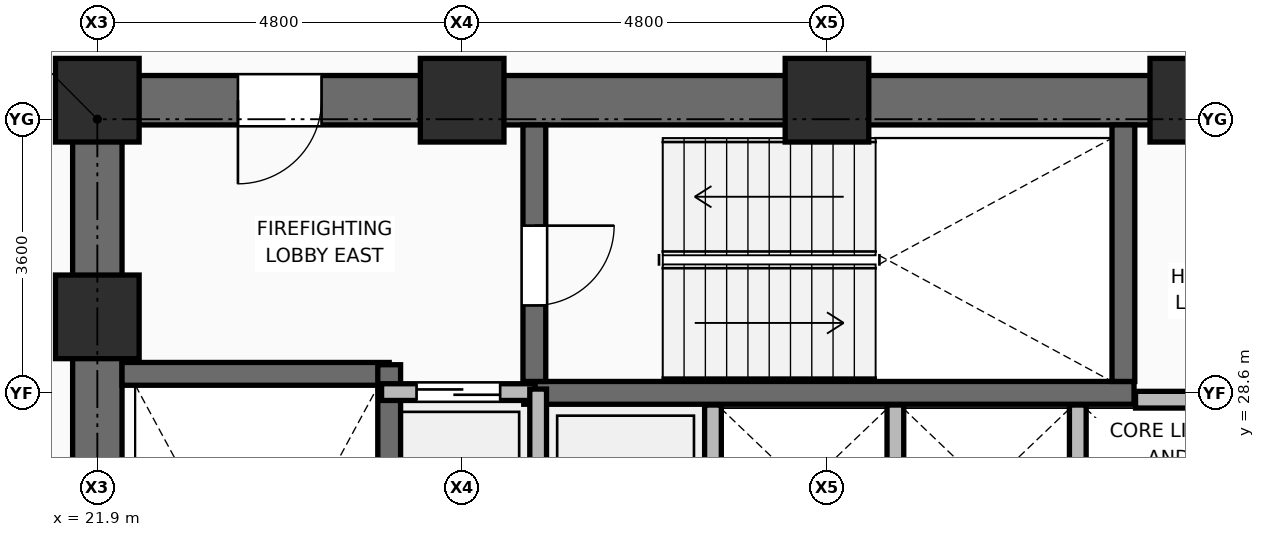
"""IFC4 building model, lengths in metres.
Left out: names, types, materials, properties, quantities, classifications, styles, units other than length and angle.
Written with IfcOpenShell. Run it as: python <this file> out.ifc"""

import sys

from ifc_helpers import new_model, si_unit, direction, frame, frame_2d, origin, origin_2d, place, context, subcontext, project, spatial, rectangle, extrude, element, fill, save


model = new_model("IFC4")
c1 = context("Model", 3, precision=1e-05, world=origin(), true_north=direction((0.0, 1.0)))
c2 = subcontext(c1, "Body", "Model", "MODEL_VIEW")
j1 = project(units=[si_unit("LENGTHUNIT", "METRE"), si_unit("PLANEANGLEUNIT", "RADIAN")], contexts=[c1])
p1 = place(None, origin())
s1 = spatial("IfcSite", under=j1, at=p1, CompositionType="ELEMENT")
p2 = place(p1, origin())
s2 = spatial("IfcBuilding", under=s1, at=p2, CompositionType="ELEMENT")
p3 = place(p2, frame((0.0, 0.0, 60.75)))
s3 = spatial("IfcBuildingStorey", under=s2, at=p3, CompositionType="ELEMENT", Elevation=60.75)
for number, where, z_axis, x_axis in (
    (1, (21.9, 29.6, 0.0), (0.0, 0.0, 1.0), (1.0, 0.0, 0.0)),
    (2, (21.9, 32.45, 0.0), (0.0, 0.0, 1.0), (1.0, 0.0, 0.0)),
    (3, (26.7, 32.45, 0.0), (0.0, 0.0, 1.0), (1.0, 0.0, 0.0)),
    (4, (31.5, 32.45, 0.0), (0.0, 0.0, 1.0), (1.0, 0.0, 0.0)),
    (5, (36.3, 32.45, 0.0), (0.0, 0.0, 1.0), (1.0, 0.0, 0.0)),
):
    element("IfcColumn", number, at=place(p3, frame(where, z_axis=z_axis, x_axis=x_axis)), inside=s3, PredefinedType="COLUMN", context=c2, shape_type="SweptSolid", body=[
        extrude(rectangle(XDim=1.1, YDim=1.1, at=origin_2d()), origin(), (0.0, 0.0, 1.0), 3.75),
    ])
p4 = place(p3, frame((30.0, 25.71, 0.0), z_axis=(0.0, 0.0, 1.0), x_axis=(0.0, 1.0, 0.0)))
e6 = element("IfcWall", 6, at=p4, inside=s3, PredefinedType="PARTITIONING", context=c2, shape_type="SweptSolid", body=[
    extrude(rectangle(XDim=2.73, YDim=0.22, at=frame_2d((1.365, 0.0))), origin(), (0.0, 0.0, 1.0), 3.545),
])
p5 = place(p3, frame((32.4, 26.2, 0.0), z_axis=(0.0, 0.0, 1.0), x_axis=(0.0, 1.0, 0.0)))
e7 = element("IfcWall", 7, at=p5, inside=s3, PredefinedType="PARTITIONING", context=c2, shape_type="SweptSolid", body=[
    extrude(rectangle(XDim=2.24, YDim=0.22, at=frame_2d((1.12, 0.0))), origin(), (0.0, 0.0, 1.0), 3.545),
])
p6 = place(p3, frame((34.8, 26.23, 0.0), z_axis=(0.0, 0.0, 1.0), x_axis=(0.0, 1.0, 0.0)))
e8 = element("IfcWall", 8, at=p6, inside=s3, PredefinedType="PARTITIONING", context=c2, shape_type="SweptSolid", body=[
    extrude(rectangle(XDim=2.21, YDim=0.22, at=frame_2d((1.105, 0.0))), origin(), (0.0, 0.0, 1.0), 3.545),
])
p7 = place(p3, frame((21.575, 32.45, 0.0), z_axis=(0.0, 0.0, 1.0), x_axis=(1.0, 0.0, 0.0)))
e9 = element("IfcWall", 9, at=p7, inside=s3, PredefinedType="SHEAR", context=c2, shape_type="SweptSolid", body=[
    extrude(rectangle(XDim=19.85, YDim=0.65, at=frame_2d((9.925, 0.0))), origin(), (0.0, 0.0, 1.0), 3.57),
])
p8 = place(p7, frame((2.175, 0.0, 0.0)))
e10 = element("IfcOpeningElement", 10, at=p8, cuts=e9, PredefinedType="OPENING", context=c2, shape_type="SweptSolid", body=[
    extrude(rectangle(XDim=1.1, YDim=2.1, at=frame_2d((0.55, 1.05))), frame((0.0, 0.335, 0.0), z_axis=(0.0, -1.0, 0.0), x_axis=(1.0, 0.0, 0.0)), (0.0, 0.0, 1.0), 0.67),
])
p9 = place(p7, frame((15.565, 0.0, 0.0)))
e11 = element("IfcOpeningElement", 11, at=p9, cuts=e9, PredefinedType="OPENING", context=c2, shape_type="SweptSolid", body=[
    extrude(rectangle(XDim=1.0, YDim=2.1, at=frame_2d((0.5, 1.05))), frame((0.0, 0.335, 0.0), z_axis=(0.0, -1.0, 0.0), x_axis=(1.0, 0.0, 0.0)), (0.0, 0.0, 1.0), 0.67),
])
p10 = place(p7, frame((17.575, 0.0, 0.0)))
e12 = element("IfcOpeningElement", 12, at=p10, cuts=e9, PredefinedType="OPENING", context=c2, shape_type="SweptSolid", body=[
    extrude(rectangle(XDim=0.9, YDim=2.1, at=frame_2d((0.45, 1.05))), frame((0.0, 0.335, 0.0), z_axis=(0.0, -1.0, 0.0), x_axis=(1.0, 0.0, 0.0)), (0.0, 0.0, 1.0), 0.67),
])
p11 = place(p3, frame((21.9, 18.125, 0.0), z_axis=(0.0, 0.0, 1.0), x_axis=(0.0, 1.0, 0.0)))
e13 = element("IfcWall", 13, at=p11, inside=s3, PredefinedType="SHEAR", context=c2, shape_type="SweptSolid", body=[
    extrude(rectangle(XDim=14.0, YDim=0.65, at=frame_2d((7.0, 0.0))), origin(), (0.0, 0.0, 1.0), 3.57),
])
p12 = place(p3, frame((22.225, 28.85, 0.0), z_axis=(0.0, 0.0, 1.0), x_axis=(1.0, 0.0, 0.0)))
e14 = element("IfcWall", 14, at=p12, inside=s3, PredefinedType="SHEAR", context=c2, shape_type="SweptSolid", body=[
    extrude(rectangle(XDim=3.515, YDim=0.3, at=frame_2d((1.757, 0.0))), origin(), (0.0, 0.0, 1.0), 3.57),
])
p13 = place(p3, frame((25.74, 20.98, 0.0), z_axis=(0.0, 0.0, 1.0), x_axis=(0.0, 1.0, 0.0)))
e15 = element("IfcWall", 15, at=p13, inside=s3, PredefinedType="SHEAR", context=c2, shape_type="SweptSolid", body=[
    extrude(rectangle(XDim=7.99, YDim=0.3, at=frame_2d((3.995, 0.0))), origin(), (0.0, 0.0, 1.0), 3.57),
])
p14 = place(p3, frame((27.51, 28.6, 0.0), z_axis=(0.0, 0.0, 1.0), x_axis=(1.0, 0.0, 0.0)))
e16 = element("IfcWall", 16, at=p14, inside=s3, PredefinedType="SHEAR", context=c2, shape_type="SweptSolid", body=[
    extrude(rectangle(XDim=8.03, YDim=0.3, at=frame_2d((4.015, 0.0))), origin(), (0.0, 0.0, 1.0), 3.57),
])
p15 = place(p3, frame((27.65, 28.75, 0.0), z_axis=(0.0, 0.0, 1.0), x_axis=(0.0, 1.0, 0.0)))
e17 = element("IfcWall", 17, at=p15, inside=s3, PredefinedType="SHEAR", context=c2, shape_type="SweptSolid", body=[
    extrude(rectangle(XDim=3.375, YDim=0.3, at=frame_2d((1.688, 0.0))), origin(), (0.0, 0.0, 1.0), 3.57),
])
p16 = place(p15, frame((1.0, 0.0, 0.0)))
e18 = element("IfcOpeningElement", 18, at=p16, cuts=e17, PredefinedType="OPENING", context=c2, shape_type="SweptSolid", body=[
    extrude(rectangle(XDim=1.05, YDim=2.1, at=frame_2d((0.525, 1.05))), frame((0.0, 0.16, 0.0), z_axis=(0.0, -1.0, 0.0), x_axis=(1.0, 0.0, 0.0)), (0.0, 0.0, 1.0), 0.32),
])
p17 = place(p3, frame((35.4, 28.75, 0.0), z_axis=(0.0, 0.0, 1.0), x_axis=(0.0, 1.0, 0.0)))
e19 = element("IfcWall", 19, at=p17, inside=s3, PredefinedType="SHEAR", context=c2, shape_type="SweptSolid", body=[
    extrude(rectangle(XDim=3.375, YDim=0.3, at=frame_2d((1.688, 0.0))), origin(), (0.0, 0.0, 1.0), 3.57),
])
p18 = place(p3, frame((25.64, 28.61, 0.0), z_axis=(0.0, 0.0, 1.0), x_axis=(1.0, 0.0, 0.0)))
e20 = element("IfcWall", 20, at=p18, inside=s3, PredefinedType="PARTITIONING", context=c2, shape_type="SweptSolid", body=[
    extrude(rectangle(XDim=2.02, YDim=0.22, at=frame_2d((1.01, 0.0))), origin(), (0.0, 0.0, 1.0), 3.55),
])
p19 = place(p18, frame((0.46, 0.0, 0.0)))
e21 = element("IfcOpeningElement", 21, at=p19, cuts=e20, PredefinedType="OPENING", context=c2, shape_type="SweptSolid", body=[
    extrude(rectangle(XDim=1.1, YDim=2.2, at=frame_2d((0.55, 1.1))), frame((0.0, 0.12, 0.0), z_axis=(0.0, -1.0, 0.0), x_axis=(1.0, 0.0, 0.0)), (0.0, 0.0, 1.0), 0.24),
])
p20 = place(p3, frame((35.56, 28.51, 0.0), z_axis=(0.0, 0.0, 1.0), x_axis=(1.0, 0.0, 0.0)))
e22 = element("IfcWall", 22, at=p20, inside=s3, PredefinedType="PARTITIONING", context=c2, shape_type="SweptSolid", body=[
    extrude(rectangle(XDim=1.6, YDim=0.22, at=frame_2d((0.8, 0.0))), origin(), (0.0, 0.0, 1.0), 3.55),
])
p21 = place(p3, frame((27.7, 25.65, 0.0), z_axis=(0.0, 0.0, 1.0), x_axis=(0.0, 1.0, 0.0)))
e23 = element("IfcWall", 23, at=p21, inside=s3, PredefinedType="PARTITIONING", context=c2, shape_type="SweptSolid", body=[
    extrude(rectangle(XDim=3.0, YDim=0.22, at=frame_2d((1.5, 0.0))), origin(), (0.0, 0.0, 1.0), 3.55),
])
p22 = place(p16, frame((1.05, 0.0, 0.0), z_axis=(0.0, 0.0, 1.0), x_axis=(-1.0, 0.0, 0.0)))
e24 = element("IfcDoor", 24, at=p22, inside=s3, OperationType="SINGLE_SWING_LEFT", PredefinedType="DOOR", context=c2, shape_type="SweptSolid", body=[
    extrude(rectangle(XDim=1.05, YDim=2.1, at=frame_2d((0.525, 1.05))), frame((0.0, 0.025, 0.0), z_axis=(0.0, -1.0, 0.0), x_axis=(1.0, 0.0, 0.0)), (0.0, 0.0, 1.0), 0.05),
])
fill(e18, e24)
p23 = place(p19, origin())
e25 = element("IfcDoor", 25, at=p23, inside=s3, OperationType="DOUBLE_DOOR_SLIDING", PredefinedType="DOOR", context=c2, shape_type="SweptSolid", body=[
    extrude(rectangle(XDim=1.1, YDim=2.2, at=frame_2d((0.55, 1.1))), frame((0.0, 0.025, 0.0), z_axis=(0.0, -1.0, 0.0), x_axis=(1.0, 0.0, 0.0)), (0.0, 0.0, 1.0), 0.05),
])
fill(e21, e25)
p24 = place(p8, frame((1.1, 0.0, 0.0), z_axis=(0.0, 0.0, 1.0), x_axis=(-1.0, 0.0, 0.0)))
e26 = element("IfcDoor", 26, at=p24, inside=s3, OperationType="SINGLE_SWING_RIGHT", PredefinedType="DOOR", context=c2, shape_type="SweptSolid", body=[
    extrude(rectangle(XDim=1.1, YDim=2.1, at=frame_2d((0.55, 1.05))), frame((0.0, 0.025, 0.0), z_axis=(0.0, -1.0, 0.0), x_axis=(1.0, 0.0, 0.0)), (0.0, 0.0, 1.0), 0.05),
])
fill(e10, e26)
save(model, sys.argv[1])
